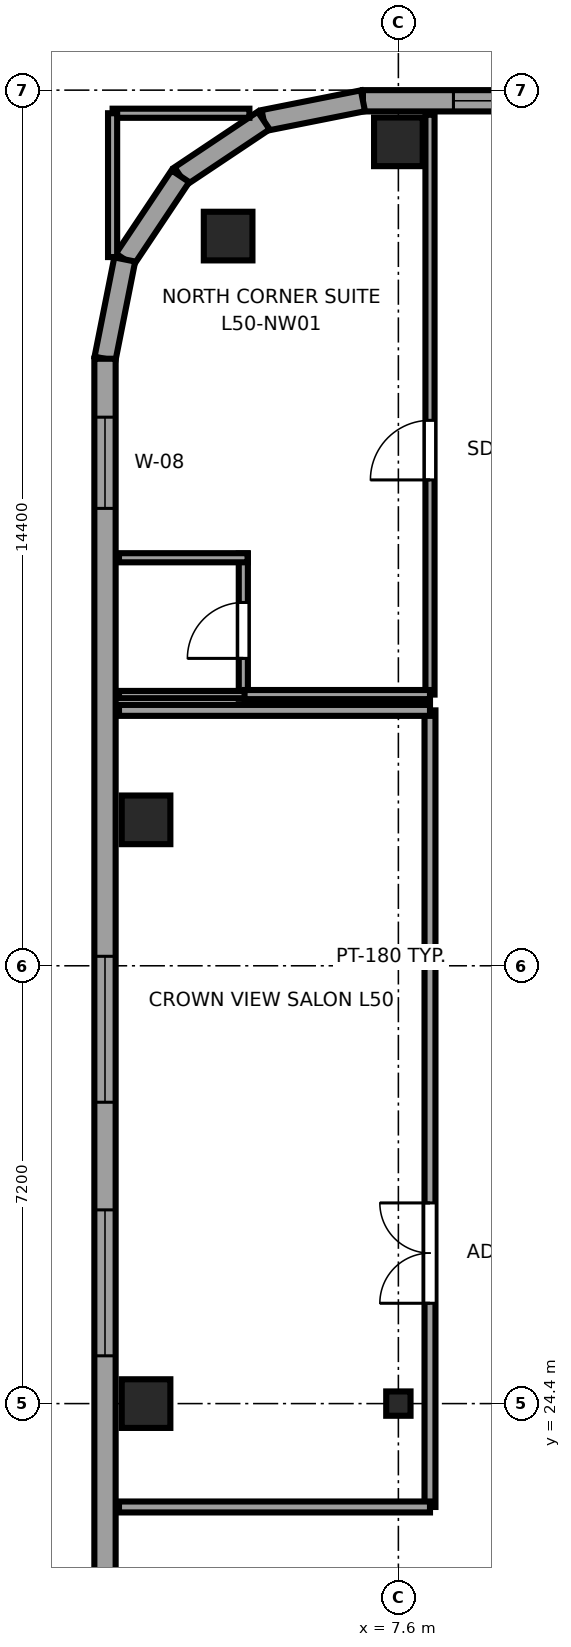
"""IFC4 building model, lengths in metres.
Left out: names, types, materials, properties, quantities, classifications, styles, units other than length and angle.
Written with IfcOpenShell. Run it as: python <this file> out.ifc"""

import sys

from ifc_helpers import new_model, si_unit, direction, frame, frame_2d, origin, origin_2d, place, context, subcontext, project, spatial, rectangle, i_section, extrude, source, transform, mapped, element, fill, save


model = new_model("IFC4")
c1 = context("Model", 3, precision=1e-05, world=origin(), true_north=direction((0.0, 1.0)))
c2 = subcontext(c1, "Body", "Model", "MODEL_VIEW")
j1 = project(units=[si_unit("LENGTHUNIT", "METRE"), si_unit("PLANEANGLEUNIT", "RADIAN")], contexts=[c1])
p1 = place(None, origin())
s1 = spatial("IfcSite", under=j1, at=p1, CompositionType="ELEMENT")
p2 = place(p1, origin())
s2 = spatial("IfcBuilding", under=s1, at=p2, CompositionType="ELEMENT")
p3 = place(p2, frame((0.0, 0.0, 191.1)))
s3 = spatial("IfcBuildingStorey", under=s2, at=p3, CompositionType="ELEMENT", Elevation=191.1)
m1 = source(origin(), c2, "Body", "SweptSolid", [
    extrude(rectangle(XDim=0.8, YDim=0.8, at=origin_2d()), origin(), (0.0, 0.0, 1.0), 3.55),
])
p4 = place(p3, frame((3.45, 24.4, 0.0), z_axis=(0.0, 0.0, 1.0), x_axis=(1.0, 0.0, 0.0)))
e1 = element("IfcColumn", 1, at=p4, inside=s3, PredefinedType="COLUMN", context=c2, shape_type="MappedRepresentation", body=[
    mapped(m1, transform((0.0, 0.0, 0.0), x_axis=(1.0, 0.0, 0.0), y_axis=(0.0, 1.0, 0.0), z_axis=(0.0, 0.0, 1.0), scale=1.0)),
])
m2 = source(origin(), c2, "Body", "SweptSolid", [
    extrude(i_section(OverallWidth=0.4, OverallDepth=0.4, WebThickness=0.02, FlangeThickness=0.035, at=origin_2d()), origin(), (0.0, 0.0, 1.0), 3.55),
])
p5 = place(p3, frame((7.6, 24.4, 0.0), z_axis=(0.0, 0.0, 1.0), x_axis=(1.0, 0.0, 0.0)))
e2 = element("IfcColumn", 2, at=p5, inside=s3, PredefinedType="COLUMN", context=c2, shape_type="MappedRepresentation", body=[
    mapped(m2, transform((0.0, 0.0, 0.0), x_axis=(1.0, 0.0, 0.0), y_axis=(0.0, 1.0, 0.0), z_axis=(0.0, 0.0, 1.0), scale=1.0)),
])
for number, where, z_axis, x_axis in (
    (3, (4.8, 43.6, 0.0), (0.0, 0.0, 1.0), (1.0, 0.0, 0.0)),
    (4, (7.6, 45.15, 0.0), (0.0, 0.0, 1.0), (1.0, 0.0, 0.0)),
    (5, (3.45, 34.0, 0.0), (0.0, 0.0, 1.0), (1.0, 0.0, 0.0)),
):
    element("IfcColumn", number, at=place(p3, frame(where, z_axis=z_axis, x_axis=x_axis)), inside=s3, PredefinedType="COLUMN", context=c2, shape_type="MappedRepresentation", body=[
        mapped(m1, transform((0.0, 0.0, 0.0), x_axis=(1.0, 0.0, 0.0), y_axis=(0.0, 1.0, 0.0), z_axis=(0.0, 0.0, 1.0), scale=1.0)),
    ])
p6 = place(p3, frame((49.983, 45.825, 0.0), z_axis=(0.0, 0.0, 1.0), x_axis=(-1.0, 0.0, 0.0)))
e6 = element("IfcWall", 6, at=p6, inside=s3, PredefinedType="SOLIDWALL", context=c2, shape_type="SweptSolid", body=[
    extrude(rectangle(XDim=42.966, YDim=0.35, at=frame_2d((21.483, 0.0))), origin(), (0.0, 0.0, 1.0), 3.37),
])
p7 = place(p6, frame((1.488, 0.0, 0.68)))
e7 = element("IfcOpeningElement", 7, at=p7, cuts=e6, PredefinedType="OPENING", context=c2, shape_type="SweptSolid", body=[
    extrude(rectangle(XDim=2.4, YDim=1.9, at=frame_2d((1.2, 0.95))), frame((0.0, 0.185, 0.0), z_axis=(0.0, -1.0, 0.0), x_axis=(1.0, 0.0, 0.0)), (0.0, 0.0, 1.0), 0.37),
])
p8 = place(p6, frame((9.841, 0.0, 0.68)))
e8 = element("IfcOpeningElement", 8, at=p8, cuts=e6, PredefinedType="OPENING", context=c2, shape_type="SweptSolid", body=[
    extrude(rectangle(XDim=2.4, YDim=1.9, at=frame_2d((1.2, 0.95))), frame((0.0, 0.185, 0.0), z_axis=(0.0, -1.0, 0.0), x_axis=(1.0, 0.0, 0.0)), (0.0, 0.0, 1.0), 0.37),
])
p9 = place(p6, frame((14.018, 0.0, 0.68)))
e9 = element("IfcOpeningElement", 9, at=p9, cuts=e6, PredefinedType="OPENING", context=c2, shape_type="SweptSolid", body=[
    extrude(rectangle(XDim=2.4, YDim=1.9, at=frame_2d((1.2, 0.95))), frame((0.0, 0.185, 0.0), z_axis=(0.0, -1.0, 0.0), x_axis=(1.0, 0.0, 0.0)), (0.0, 0.0, 1.0), 0.37),
])
p10 = place(p6, frame((18.195, 0.0, 0.68)))
e10 = element("IfcOpeningElement", 10, at=p10, cuts=e6, PredefinedType="OPENING", context=c2, shape_type="SweptSolid", body=[
    extrude(rectangle(XDim=2.4, YDim=1.9, at=frame_2d((1.2, 0.95))), frame((0.0, 0.185, 0.0), z_axis=(0.0, -1.0, 0.0), x_axis=(1.0, 0.0, 0.0)), (0.0, 0.0, 1.0), 0.37),
])
p11 = place(p6, frame((22.371, 0.0, 0.68)))
e11 = element("IfcOpeningElement", 11, at=p11, cuts=e6, PredefinedType="OPENING", context=c2, shape_type="SweptSolid", body=[
    extrude(rectangle(XDim=2.4, YDim=1.9, at=frame_2d((1.2, 0.95))), frame((0.0, 0.185, 0.0), z_axis=(0.0, -1.0, 0.0), x_axis=(1.0, 0.0, 0.0)), (0.0, 0.0, 1.0), 0.37),
])
p12 = place(p6, frame((26.548, 0.0, 0.68)))
e12 = element("IfcOpeningElement", 12, at=p12, cuts=e6, PredefinedType="OPENING", context=c2, shape_type="SweptSolid", body=[
    extrude(rectangle(XDim=2.4, YDim=1.9, at=frame_2d((1.2, 0.95))), frame((0.0, 0.185, 0.0), z_axis=(0.0, -1.0, 0.0), x_axis=(1.0, 0.0, 0.0)), (0.0, 0.0, 1.0), 0.37),
])
p13 = place(p6, frame((30.724, 0.0, 0.68)))
e13 = element("IfcOpeningElement", 13, at=p13, cuts=e6, PredefinedType="OPENING", context=c2, shape_type="SweptSolid", body=[
    extrude(rectangle(XDim=2.4, YDim=1.9, at=frame_2d((1.2, 0.95))), frame((0.0, 0.185, 0.0), z_axis=(0.0, -1.0, 0.0), x_axis=(1.0, 0.0, 0.0)), (0.0, 0.0, 1.0), 0.37),
])
p14 = place(p6, frame((34.901, 0.0, 0.68)))
e14 = element("IfcOpeningElement", 14, at=p14, cuts=e6, PredefinedType="OPENING", context=c2, shape_type="SweptSolid", body=[
    extrude(rectangle(XDim=2.4, YDim=1.9, at=frame_2d((1.2, 0.95))), frame((0.0, 0.185, 0.0), z_axis=(0.0, -1.0, 0.0), x_axis=(1.0, 0.0, 0.0)), (0.0, 0.0, 1.0), 0.37),
])
p15 = place(p6, frame((39.077, 0.0, 0.68)))
e15 = element("IfcOpeningElement", 15, at=p15, cuts=e6, PredefinedType="OPENING", context=c2, shape_type="SweptSolid", body=[
    extrude(rectangle(XDim=2.4, YDim=1.9, at=frame_2d((1.2, 0.95))), frame((0.0, 0.185, 0.0), z_axis=(0.0, -1.0, 0.0), x_axis=(1.0, 0.0, 0.0)), (0.0, 0.0, 1.0), 0.37),
])
p16 = place(p3, frame((7.017, 45.825, 0.0), z_axis=(0.0, 0.0, 1.0), x_axis=(-0.980788844421, -0.195072403631, 0.0)))
e16 = element("IfcWall", 16, at=p16, inside=s3, PredefinedType="SOLIDWALL", context=c2, shape_type="SweptSolid", body=[
    extrude(rectangle(XDim=1.665, YDim=0.35, at=frame_2d((0.832, 0.0))), origin(), (0.0, 0.0, 1.0), 3.37),
])
for number, where, z_axis, x_axis in (
    (17, (5.385, 45.5, 0.0), (0.0, 0.0, 1.0), (-0.832, -0.556, 0.0)),
    (18, (4.015, 44.585, 0.0), (0.0, 0.0, 1.0), (-0.556, -0.831, 0.0)),
):
    element("IfcWall", number, at=place(p3, frame(where, z_axis=z_axis, x_axis=x_axis)), inside=s3, PredefinedType="SOLIDWALL", context=c2, shape_type="SweptSolid", body=[
        extrude(rectangle(XDim=1.647, YDim=0.35, at=frame_2d((0.824, 0.0))), origin(), (0.0, 0.0, 1.0), 2.832),
    ])
p17 = place(p3, frame((3.1, 43.216, 0.0), z_axis=(0.0, 0.0, 1.0), x_axis=(-0.195044345786, -0.980794424524, 0.0)))
e19 = element("IfcWall", 19, at=p17, inside=s3, PredefinedType="SOLIDWALL", context=c2, shape_type="SweptSolid", body=[
    extrude(rectangle(XDim=1.665, YDim=0.35, at=frame_2d((0.833, 0.0))), origin(), (0.0, 0.0, 1.0), 3.37),
])
p18 = place(p3, frame((2.775, 41.583, 0.0), z_axis=(0.0, 0.0, 1.0), x_axis=(0.0, -1.0, 0.0)))
e20 = element("IfcWall", 20, at=p18, inside=s3, PredefinedType="SOLIDWALL", context=c2, shape_type="SweptSolid", body=[
    extrude(rectangle(XDim=34.566, YDim=0.35, at=frame_2d((17.283, 0.0))), origin(), (0.0, 0.0, 1.0), 3.37),
])
p19 = place(p18, frame((9.827, 0.0, 0.68)))
e21 = element("IfcOpeningElement", 21, at=p19, cuts=e20, PredefinedType="OPENING", context=c2, shape_type="SweptSolid", body=[
    extrude(rectangle(XDim=2.4, YDim=1.9, at=frame_2d((1.2, 0.95))), frame((0.0, 0.185, 0.0), z_axis=(0.0, -1.0, 0.0), x_axis=(1.0, 0.0, 0.0)), (0.0, 0.0, 1.0), 0.37),
])
p20 = place(p18, frame((13.997, 0.0, 0.68)))
e22 = element("IfcOpeningElement", 22, at=p20, cuts=e20, PredefinedType="OPENING", context=c2, shape_type="SweptSolid", body=[
    extrude(rectangle(XDim=2.4, YDim=1.9, at=frame_2d((1.2, 0.95))), frame((0.0, 0.185, 0.0), z_axis=(0.0, -1.0, 0.0), x_axis=(1.0, 0.0, 0.0)), (0.0, 0.0, 1.0), 0.37),
])
p21 = place(p18, frame((22.339, 0.0, 0.68)))
e23 = element("IfcOpeningElement", 23, at=p21, cuts=e20, PredefinedType="OPENING", context=c2, shape_type="SweptSolid", body=[
    extrude(rectangle(XDim=2.4, YDim=1.9, at=frame_2d((1.2, 0.95))), frame((0.0, 0.185, 0.0), z_axis=(0.0, -1.0, 0.0), x_axis=(1.0, 0.0, 0.0)), (0.0, 0.0, 1.0), 0.37),
])
p22 = place(p18, frame((26.51, 0.0, 0.68)))
e24 = element("IfcOpeningElement", 24, at=p22, cuts=e20, PredefinedType="OPENING", context=c2, shape_type="SweptSolid", body=[
    extrude(rectangle(XDim=2.4, YDim=1.9, at=frame_2d((1.2, 0.95))), frame((0.0, 0.185, 0.0), z_axis=(0.0, -1.0, 0.0), x_axis=(1.0, 0.0, 0.0)), (0.0, 0.0, 1.0), 0.37),
])
p23 = place(p18, frame((31.433, 0.0, 0.62)))
e25 = element("IfcOpeningElement", 25, at=p23, cuts=e20, PredefinedType="OPENING", context=c2, shape_type="SweptSolid", body=[
    extrude(rectangle(XDim=1.5, YDim=1.55, at=frame_2d((0.75, 0.775))), frame((0.0, 0.185, 0.0), z_axis=(0.0, -1.0, 0.0), x_axis=(1.0, 0.0, 0.0)), (0.0, 0.0, 1.0), 0.37),
])
p24 = place(p18, frame((0.961, 0.0, 0.62)))
e26 = element("IfcOpeningElement", 26, at=p24, cuts=e20, PredefinedType="OPENING", context=c2, shape_type="SweptSolid", body=[
    extrude(rectangle(XDim=1.5, YDim=1.55, at=frame_2d((0.75, 0.775))), frame((0.0, 0.185, 0.0), z_axis=(0.0, -1.0, 0.0), x_axis=(1.0, 0.0, 0.0)), (0.0, 0.0, 1.0), 0.37),
])
p25 = place(p3, frame((5.05, 35.99, 0.0), z_axis=(0.0, 0.0, 1.0), x_axis=(0.0, 1.0, 0.0)))
e27 = element("IfcWall", 27, at=p25, inside=s3, PredefinedType="PARTITIONING", context=c2, shape_type="SweptSolid", body=[
    extrude(rectangle(XDim=2.39, YDim=0.15, at=frame_2d((1.195, 0.0))), origin(), (0.0, 0.0, 1.0), 3.37),
])
p26 = place(p25, frame((0.665, 0.0, 0.0)))
e28 = element("IfcOpeningElement", 28, at=p26, cuts=e27, PredefinedType="OPENING", context=c2, shape_type="SweptSolid", body=[
    extrude(rectangle(XDim=0.92, YDim=2.01, at=frame_2d((0.46, 1.005))), frame((0.0, 0.085, 0.0), z_axis=(0.0, -1.0, 0.0), x_axis=(1.0, 0.0, 0.0)), (0.0, 0.0, 1.0), 0.17),
])
p27 = place(p3, frame((3.005, 36.06, 0.0), z_axis=(0.0, 0.0, 1.0), x_axis=(1.0, 0.0, 0.0)))
e29 = element("IfcWall", 29, at=p27, inside=s3, PredefinedType="PLUMBINGWALL", context=c2, shape_type="SweptSolid", body=[
    extrude(rectangle(XDim=2.115, YDim=0.12, at=frame_2d((1.058, 0.0))), origin(), (0.0, 0.0, 1.0), 3.37),
])
p28 = place(p3, frame((3.005, 38.31, 0.0), z_axis=(0.0, 0.0, 1.0), x_axis=(1.0, 0.0, 0.0)))
e30 = element("IfcWall", 30, at=p28, inside=s3, PredefinedType="PARTITIONING", context=c2, shape_type="SweptSolid", body=[
    extrude(rectangle(XDim=2.115, YDim=0.15, at=frame_2d((1.058, 0.0))), origin(), (0.0, 0.0, 1.0), 3.37),
])
p29 = place(p3, frame((8.12, 22.7, 0.0), z_axis=(0.0, 0.0, 1.0), x_axis=(0.0, 1.0, 0.0)))
e31 = element("IfcWall", 31, at=p29, inside=s3, PredefinedType="PARTITIONING", context=c2, shape_type="SweptSolid", body=[
    extrude(rectangle(XDim=13.1, YDim=0.18, at=frame_2d((6.55, 0.0))), origin(), (0.0, 0.0, 1.0), 3.37),
])
p30 = place(p29, frame((3.35, 0.0, 0.0)))
e32 = element("IfcOpeningElement", 32, at=p30, cuts=e31, PredefinedType="OPENING", context=c2, shape_type="SweptSolid", body=[
    extrude(rectangle(XDim=1.65, YDim=2.15, at=frame_2d((0.825, 1.075))), frame((0.0, 0.1, 0.0), z_axis=(0.0, -1.0, 0.0), x_axis=(1.0, 0.0, 0.0)), (0.0, 0.0, 1.0), 0.2),
])
for number, where, z_axis, x_axis in (
    (33, (3.005, 22.7, 0.0), (0.0, 0.0, 1.0), (1.0, 0.0, 0.0)),
    (34, (3.005, 35.8, 0.0), (0.0, 0.0, 1.0), (1.0, 0.0, 0.0)),
):
    element("IfcWall", number, at=place(p3, frame(where, z_axis=z_axis, x_axis=x_axis)), inside=s3, PredefinedType="PARTITIONING", context=c2, shape_type="SweptSolid", body=[
        extrude(rectangle(XDim=5.115, YDim=0.18, at=frame_2d((2.558, 0.0))), origin(), (0.0, 0.0, 1.0), 3.37),
    ])
p31 = place(p3, frame((8.12, 36.06, 0.0), z_axis=(0.0, 0.0, 1.0), x_axis=(0.0, 1.0, 0.0)))
e35 = element("IfcWall", 35, at=p31, inside=s3, PredefinedType="PARTITIONING", context=c2, shape_type="SweptSolid", body=[
    extrude(rectangle(XDim=9.535, YDim=0.15, at=frame_2d((4.768, 0.0))), origin(), (0.0, 0.0, 1.0), 3.37),
])
p32 = place(p31, frame((3.53, 0.0, 0.0)))
e36 = element("IfcOpeningElement", 36, at=p32, cuts=e35, PredefinedType="OPENING", context=c2, shape_type="SweptSolid", body=[
    extrude(rectangle(XDim=0.98, YDim=2.12, at=frame_2d((0.49, 1.06))), frame((0.0, 0.085, 0.0), z_axis=(0.0, -1.0, 0.0), x_axis=(1.0, 0.0, 0.0)), (0.0, 0.0, 1.0), 0.17),
])
p33 = place(p3, frame((5.07, 36.06, 0.0), z_axis=(0.0, 0.0, 1.0), x_axis=(1.0, 0.0, 0.0)))
e37 = element("IfcWall", 37, at=p33, inside=s3, PredefinedType="PARTITIONING", context=c2, shape_type="SweptSolid", body=[
    extrude(rectangle(XDim=3.05, YDim=0.15, at=frame_2d((1.525, 0.0))), origin(), (0.0, 0.0, 1.0), 3.37),
])
p34 = place(p3, frame((2.9, 45.62, 0.0), z_axis=(0.0, 0.0, 1.0), x_axis=(1.0, 0.0, 0.0)))
e38 = element("IfcWall", 38, at=p34, inside=s3, PredefinedType="PARTITIONING", context=c2, shape_type="SweptSolid", body=[
    extrude(rectangle(XDim=2.25, YDim=0.15, at=frame_2d((1.125, 0.0))), origin(), (0.0, 0.0, 1.0), 3.37),
])
p35 = place(p3, frame((2.9, 43.255, 0.0), z_axis=(0.0, 0.0, 1.0), x_axis=(0.0, 1.0, 0.0)))
e39 = element("IfcWall", 39, at=p35, inside=s3, PredefinedType="PARTITIONING", context=c2, shape_type="SweptSolid", body=[
    extrude(rectangle(XDim=2.365, YDim=0.15, at=frame_2d((1.183, 0.0))), origin(), (0.0, 0.0, 1.0), 3.37),
])
m3 = source(origin(), c2, "Body", "SweptSolid", [
    extrude(rectangle(XDim=2.4, YDim=1.9, at=frame_2d((1.2, 0.95))), frame((0.0, 0.09, 0.0), z_axis=(0.0, -1.0, 0.0), x_axis=(1.0, 0.0, 0.0)), (0.0, 0.0, 1.0), 0.06),
])
p36 = place(p15, origin())
e40 = element("IfcWindow", 40, at=p36, inside=s3, PartitioningType="TRIPLE_PANEL_HORIZONTAL", PredefinedType="WINDOW", context=c2, shape_type="MappedRepresentation", body=[
    mapped(m3, transform((0.0, 0.0, 0.0), x_axis=(1.0, 0.0, 0.0), y_axis=(0.0, 1.0, 0.0), z_axis=(0.0, 0.0, 1.0), scale=1.0)),
])
fill(e15, e40)
p37 = place(p19, origin())
e41 = element("IfcWindow", 41, at=p37, inside=s3, PartitioningType="TRIPLE_PANEL_HORIZONTAL", PredefinedType="WINDOW", context=c2, shape_type="MappedRepresentation", body=[
    mapped(m3, transform((0.0, 0.0, 0.0), x_axis=(1.0, 0.0, 0.0), y_axis=(0.0, 1.0, 0.0), z_axis=(0.0, 0.0, 1.0), scale=1.0)),
])
fill(e21, e41)
p38 = place(p20, origin())
e42 = element("IfcWindow", 42, at=p38, inside=s3, PartitioningType="TRIPLE_PANEL_HORIZONTAL", PredefinedType="WINDOW", context=c2, shape_type="MappedRepresentation", body=[
    mapped(m3, transform((0.0, 0.0, 0.0), x_axis=(1.0, 0.0, 0.0), y_axis=(0.0, 1.0, 0.0), z_axis=(0.0, 0.0, 1.0), scale=1.0)),
])
fill(e22, e42)
m4 = source(origin(), c2, "Body", "SweptSolid", [
    extrude(rectangle(XDim=1.5, YDim=1.55, at=frame_2d((0.75, 0.775))), frame((0.0, 0.09, 0.0), z_axis=(0.0, -1.0, 0.0), x_axis=(1.0, 0.0, 0.0)), (0.0, 0.0, 1.0), 0.06),
])
p39 = place(p24, origin())
e43 = element("IfcWindow", 43, at=p39, inside=s3, PartitioningType="SINGLE_PANEL", PredefinedType="WINDOW", context=c2, shape_type="MappedRepresentation", body=[
    mapped(m4, transform((0.0, 0.0, 0.0), x_axis=(1.0, 0.0, 0.0), y_axis=(0.0, 1.0, 0.0), z_axis=(0.0, 0.0, 1.0), scale=1.0)),
])
fill(e26, e43)
m5 = source(origin(), c2, "Body", "SweptSolid", [
    extrude(rectangle(XDim=0.92, YDim=2.01, at=frame_2d((0.46, 1.005))), frame((0.0, 0.025, 0.0), z_axis=(0.0, -1.0, 0.0), x_axis=(1.0, 0.0, 0.0)), (0.0, 0.0, 1.0), 0.05),
])
p40 = place(p26, origin())
e44 = element("IfcDoor", 44, at=p40, inside=s3, OperationType="SINGLE_SWING_LEFT", PredefinedType="DOOR", context=c2, shape_type="MappedRepresentation", body=[
    mapped(m5, transform((0.0, 0.0, 0.0), x_axis=(1.0, 0.0, 0.0), y_axis=(0.0, 1.0, 0.0), z_axis=(0.0, 0.0, 1.0), scale=1.0)),
])
fill(e28, e44)
m6 = source(origin(), c2, "Body", "SweptSolid", [
    extrude(rectangle(XDim=1.65, YDim=2.15, at=frame_2d((0.825, 1.075))), frame((0.0, 0.025, 0.0), z_axis=(0.0, -1.0, 0.0), x_axis=(1.0, 0.0, 0.0)), (0.0, 0.0, 1.0), 0.05),
])
p41 = place(p30, origin())
e45 = element("IfcDoor", 45, at=p41, inside=s3, OperationType="DOUBLE_DOOR_SINGLE_SWING", PredefinedType="DOOR", context=c2, shape_type="MappedRepresentation", body=[
    mapped(m6, transform((0.0, 0.0, 0.0), x_axis=(1.0, 0.0, 0.0), y_axis=(0.0, 1.0, 0.0), z_axis=(0.0, 0.0, 1.0), scale=1.0)),
])
fill(e32, e45)
m7 = source(origin(), c2, "Body", "SweptSolid", [
    extrude(rectangle(XDim=0.98, YDim=2.12, at=frame_2d((0.49, 1.06))), frame((0.0, 0.025, 0.0), z_axis=(0.0, -1.0, 0.0), x_axis=(1.0, 0.0, 0.0)), (0.0, 0.0, 1.0), 0.05),
])
p42 = place(p32, origin())
e46 = element("IfcDoor", 46, at=p42, inside=s3, OperationType="SINGLE_SWING_LEFT", PredefinedType="DOOR", context=c2, shape_type="MappedRepresentation", body=[
    mapped(m7, transform((0.0, 0.0, 0.0), x_axis=(1.0, 0.0, 0.0), y_axis=(0.0, 1.0, 0.0), z_axis=(0.0, 0.0, 1.0), scale=1.0)),
])
fill(e36, e46)
save(model, sys.argv[1])
